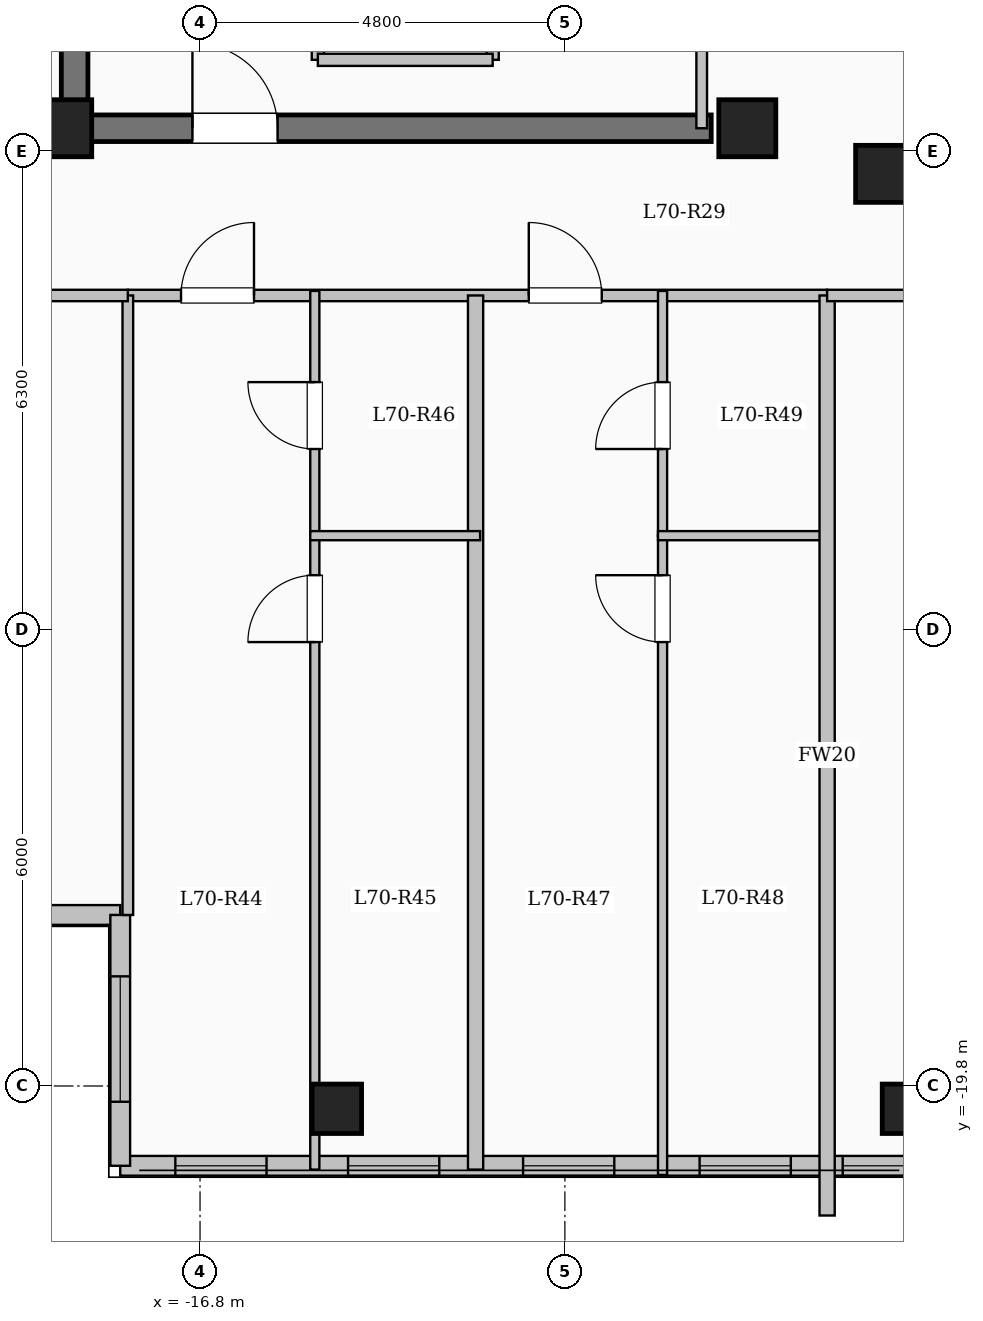
"""IFC4 building model, lengths in metres.
Left out: names, types, materials, properties, quantities, classifications, styles, units other than length and angle.
Written with IfcOpenShell. Run it as: python <this file> out.ifc"""

import sys

from ifc_helpers import new_model, si_unit, direction, frame, frame_2d, origin, origin_2d, place, context, subcontext, project, spatial, rectangle, extrude, element, fill, save


model = new_model("IFC4")
c1 = context("Model", 3, precision=1e-05, world=origin(), true_north=direction((0.0, 1.0)))
c2 = subcontext(c1, "Body", "Model", "MODEL_VIEW")
j1 = project(units=[si_unit("LENGTHUNIT", "METRE"), si_unit("PLANEANGLEUNIT", "RADIAN")], contexts=[c1])
p1 = place(None, origin())
s1 = spatial("IfcSite", under=j1, at=p1, CompositionType="ELEMENT")
p2 = place(p1, origin())
s2 = spatial("IfcBuilding", under=s1, at=p2, CompositionType="ELEMENT")
p3 = place(p2, frame((0.0, 0.0, 258.25)))
s3 = spatial("IfcBuildingStorey", under=s2, at=p3, CompositionType="ELEMENT", Elevation=258.25)
for number, where, z_axis, x_axis in (
    (1, (-7.8, -7.8, 0.0), (0.0, 0.0, 1.0), (1.0, 0.0, 0.0)),
    (2, (-9.6, -7.2, 0.0), (0.0, 0.0, 1.0), (1.0, 0.0, 0.0)),
    (3, (-18.6, -7.2, 0.0), (0.0, 0.0, 1.0), (1.0, 0.0, 0.0)),
):
    element("IfcColumn", number, at=place(p3, frame(where, z_axis=z_axis, x_axis=x_axis)), inside=s3, PredefinedType="COLUMN", context=c2, shape_type="SweptSolid", body=[
        extrude(rectangle(XDim=0.75, YDim=0.75, at=origin_2d()), origin(), (0.0, 0.0, 1.0), 3.35),
    ])
for number, where, z_axis, x_axis in (
    (4, (-15.0, -20.1, 0.0), (0.0, 0.0, 1.0), (1.0, 0.0, 0.0)),
    (5, (-7.5, -20.1, 0.0), (0.0, 0.0, 1.0), (1.0, 0.0, 0.0)),
):
    element("IfcColumn", number, at=place(p3, frame(where, z_axis=z_axis, x_axis=x_axis)), inside=s3, PredefinedType="COLUMN", context=c2, shape_type="SweptSolid", body=[
        extrude(rectangle(XDim=0.65, YDim=0.65, at=origin_2d()), origin(), (0.0, 0.0, 1.0), 3.35),
    ])
p4 = place(p3, frame((-17.85, -17.55, 0.0), z_axis=(0.0, 0.0, 1.0), x_axis=(-1.0, 0.0, 0.0)))
e6 = element("IfcWall", 6, at=p4, inside=s3, PredefinedType="SOLIDWALL", context=c2, shape_type="SweptSolid", body=[
    extrude(rectangle(XDim=4.8, YDim=0.26, at=frame_2d((2.4, 0.0))), origin(), (0.0, 0.0, 1.0), 3.1),
])
p5 = place(p4, frame((1.275, 0.0, 0.9)))
e7 = element("IfcOpeningElement", 7, at=p5, cuts=e6, PredefinedType="OPENING", context=c2, shape_type="SweptSolid", body=[
    extrude(rectangle(XDim=2.2, YDim=1.75, at=frame_2d((1.1, 0.875))), frame((0.0, 0.14, 0.0), z_axis=(0.0, -1.0, 0.0), x_axis=(1.0, 0.0, 0.0)), (0.0, 0.0, 1.0), 0.28),
])
p6 = place(p3, frame((-7.35, -20.85, 0.0), z_axis=(0.0, 0.0, 1.0), x_axis=(-1.0, 0.0, 0.0)))
e8 = element("IfcWall", 8, at=p6, inside=s3, PredefinedType="SOLIDWALL", context=c2, shape_type="SweptSolid", body=[
    extrude(rectangle(XDim=10.5, YDim=0.26, at=frame_2d((5.25, 0.0))), origin(), (0.0, 0.0, 1.0), 3.1),
])
p7 = place(p6, frame((0.145, 0.0, 0.95)))
e9 = element("IfcOpeningElement", 9, at=p7, cuts=e8, PredefinedType="OPENING", context=c2, shape_type="SweptSolid", body=[
    extrude(rectangle(XDim=0.85, YDim=1.5, at=frame_2d((0.425, 0.75))), frame((0.0, 0.14, 0.0), z_axis=(0.0, -1.0, 0.0), x_axis=(1.0, 0.0, 0.0)), (0.0, 0.0, 1.0), 0.28),
])
p8 = place(p6, frame((1.677, 0.0, 0.95)))
e10 = element("IfcOpeningElement", 10, at=p8, cuts=e8, PredefinedType="OPENING", context=c2, shape_type="SweptSolid", body=[
    extrude(rectangle(XDim=1.2, YDim=1.5, at=frame_2d((0.6, 0.75))), frame((0.0, 0.14, 0.0), z_axis=(0.0, -1.0, 0.0), x_axis=(1.0, 0.0, 0.0)), (0.0, 0.0, 1.0), 0.28),
])
p9 = place(p6, frame((4.0, 0.0, 0.95)))
e11 = element("IfcOpeningElement", 11, at=p9, cuts=e8, PredefinedType="OPENING", context=c2, shape_type="SweptSolid", body=[
    extrude(rectangle(XDim=1.2, YDim=1.5, at=frame_2d((0.6, 0.75))), frame((0.0, 0.14, 0.0), z_axis=(0.0, -1.0, 0.0), x_axis=(1.0, 0.0, 0.0)), (0.0, 0.0, 1.0), 0.28),
])
p10 = place(p6, frame((6.302, 0.0, 0.95)))
e12 = element("IfcOpeningElement", 12, at=p10, cuts=e8, PredefinedType="OPENING", context=c2, shape_type="SweptSolid", body=[
    extrude(rectangle(XDim=1.2, YDim=1.5, at=frame_2d((0.6, 0.75))), frame((0.0, 0.14, 0.0), z_axis=(0.0, -1.0, 0.0), x_axis=(1.0, 0.0, 0.0)), (0.0, 0.0, 1.0), 0.28),
])
p11 = place(p6, frame((8.575, 0.0, 0.95)))
e13 = element("IfcOpeningElement", 13, at=p11, cuts=e8, PredefinedType="OPENING", context=c2, shape_type="SweptSolid", body=[
    extrude(rectangle(XDim=1.2, YDim=1.5, at=frame_2d((0.6, 0.75))), frame((0.0, 0.14, 0.0), z_axis=(0.0, -1.0, 0.0), x_axis=(1.0, 0.0, 0.0)), (0.0, 0.0, 1.0), 0.28),
])
p12 = place(p3, frame((-17.85, -20.85, 0.0), z_axis=(0.0, 0.0, 1.0), x_axis=(0.0, 1.0, 0.0)))
e14 = element("IfcWall", 14, at=p12, inside=s3, PredefinedType="SOLIDWALL", context=c2, shape_type="SweptSolid", body=[
    extrude(rectangle(XDim=3.3, YDim=0.26, at=frame_2d((1.65, 0.0))), origin(), (0.0, 0.0, 1.0), 3.1),
])
p13 = place(p12, frame((0.843, 0.0, 0.9)))
e15 = element("IfcOpeningElement", 15, at=p13, cuts=e14, PredefinedType="OPENING", context=c2, shape_type="SweptSolid", body=[
    extrude(rectangle(XDim=1.65, YDim=1.6, at=frame_2d((0.825, 0.8))), frame((0.0, 0.14, 0.0), z_axis=(0.0, -1.0, 0.0), x_axis=(1.0, 0.0, 0.0)), (0.0, 0.0, 1.0), 0.28),
])
p14 = place(p3, frame((-15.25, -6.3, 0.0), z_axis=(0.0, 0.0, 1.0), x_axis=(0.0, 1.0, 0.0)))
e16 = element("IfcWall", 16, at=p14, inside=s3, PredefinedType="SOLIDWALL", context=c2, shape_type="SweptSolid", body=[
    extrude(rectangle(XDim=2.6, YDim=0.16, at=frame_2d((1.3, 0.0))), origin(), (0.0, 0.0, 1.0), 3.1),
])
p15 = place(p14, frame((0.75, 0.0, 0.0)))
e17 = element("IfcOpeningElement", 17, at=p15, cuts=e16, PredefinedType="OPENING", context=c2, shape_type="SweptSolid", body=[
    extrude(rectangle(XDim=1.1, YDim=2.15, at=frame_2d((0.55, 1.075))), frame((0.0, 0.09, 0.0), z_axis=(0.0, -1.0, 0.0), x_axis=(1.0, 0.0, 0.0)), (0.0, 0.0, 1.0), 0.18),
])
p16 = place(p3, frame((-12.95, -6.3, 0.0), z_axis=(0.0, 0.0, 1.0), x_axis=(0.0, 1.0, 0.0)))
e18 = element("IfcWall", 18, at=p16, inside=s3, PredefinedType="SOLIDWALL", context=c2, shape_type="SweptSolid", body=[
    extrude(rectangle(XDim=2.6, YDim=0.16, at=frame_2d((1.3, 0.0))), origin(), (0.0, 0.0, 1.0), 3.1),
])
p17 = place(p3, frame((-15.25, -6.3, 0.0), z_axis=(0.0, 0.0, 1.0), x_axis=(1.0, 0.0, 0.0)))
e19 = element("IfcWall", 19, at=p17, inside=s3, PredefinedType="SOLIDWALL", context=c2, shape_type="SweptSolid", body=[
    extrude(rectangle(XDim=2.3, YDim=0.16, at=frame_2d((1.15, 0.0))), origin(), (0.0, 0.0, 1.0), 3.1),
])
p18 = place(p3, frame((-18.45, -7.375, 0.0), z_axis=(0.0, 0.0, 1.0), x_axis=(0.0, 1.0, 0.0)))
e20 = element("IfcWall", 20, at=p18, inside=s3, PredefinedType="SHEAR", context=c2, shape_type="SweptSolid", body=[
    extrude(rectangle(XDim=14.05, YDim=0.35, at=frame_2d((7.025, 0.0))), origin(), (0.0, 0.0, 1.0), 3.35),
])
p19 = place(p3, frame((-18.625, -7.2, 0.0), z_axis=(0.0, 0.0, 1.0), x_axis=(1.0, 0.0, 0.0)))
e21 = element("IfcWall", 21, at=p19, inside=s3, PredefinedType="SHEAR", context=c2, shape_type="SweptSolid", body=[
    extrude(rectangle(XDim=8.55, YDim=0.35, at=frame_2d((4.275, 0.0))), origin(), (0.0, 0.0, 1.0), 3.35),
])
p20 = place(p19, frame((1.725, 0.0, 0.0)))
e22 = element("IfcOpeningElement", 22, at=p20, cuts=e21, PredefinedType="OPENING", context=c2, shape_type="SweptSolid", body=[
    extrude(rectangle(XDim=1.12, YDim=2.15, at=frame_2d((0.56, 1.075))), frame((0.0, 0.185, 0.0), z_axis=(0.0, -1.0, 0.0), x_axis=(1.0, 0.0, 0.0)), (0.0, 0.0, 1.0), 0.37),
])
p21 = place(p3, frame((-10.2, -7.2, 0.0), z_axis=(0.0, 0.0, 1.0), x_axis=(0.0, 1.0, 0.0)))
e23 = element("IfcWall", 23, at=p21, inside=s3, PredefinedType="PARTITIONING", context=c2, shape_type="SweptSolid", body=[
    extrude(rectangle(XDim=9.12, YDim=0.14, at=frame_2d((4.56, 0.0))), origin(), (0.0, 0.0, 1.0), 3.1),
])
p22 = place(p21, frame((1.6, 0.0, 0.0)))
e24 = element("IfcOpeningElement", 24, at=p22, cuts=e23, PredefinedType="OPENING", context=c2, shape_type="SweptSolid", body=[
    extrude(rectangle(XDim=0.95, YDim=2.12, at=frame_2d((0.475, 1.06))), frame((0.0, 0.08, 0.0), z_axis=(0.0, -1.0, 0.0), x_axis=(1.0, 0.0, 0.0)), (0.0, 0.0, 1.0), 0.16),
])
p23 = place(p21, frame((7.9, 0.0, 0.0)))
e25 = element("IfcOpeningElement", 25, at=p23, cuts=e23, PredefinedType="OPENING", context=c2, shape_type="SweptSolid", body=[
    extrude(rectangle(XDim=0.95, YDim=2.12, at=frame_2d((0.475, 1.06))), frame((0.0, 0.08, 0.0), z_axis=(0.0, -1.0, 0.0), x_axis=(1.0, 0.0, 0.0)), (0.0, 0.0, 1.0), 0.16),
])
p24 = place(p3, frame((-17.75, -9.4, 0.0), z_axis=(0.0, 0.0, 1.0), x_axis=(1.0, 0.0, 0.0)))
e26 = element("IfcWall", 26, at=p24, inside=s3, PredefinedType="PARTITIONING", context=c2, shape_type="SweptSolid", body=[
    extrude(rectangle(XDim=9.2, YDim=0.15, at=frame_2d((4.6, 0.0))), origin(), (0.0, 0.0, 1.0), 3.1),
])
p25 = place(p24, frame((0.7, 0.0, 0.0)))
e27 = element("IfcOpeningElement", 27, at=p25, cuts=e26, PredefinedType="OPENING", context=c2, shape_type="SweptSolid", body=[
    extrude(rectangle(XDim=0.96, YDim=2.15, at=frame_2d((0.48, 1.075))), frame((0.0, 0.085, 0.0), z_axis=(0.0, -1.0, 0.0), x_axis=(1.0, 0.0, 0.0)), (0.0, 0.0, 1.0), 0.17),
])
p26 = place(p24, frame((5.275, 0.0, 0.0)))
e28 = element("IfcOpeningElement", 28, at=p26, cuts=e26, PredefinedType="OPENING", context=c2, shape_type="SweptSolid", body=[
    extrude(rectangle(XDim=0.96, YDim=2.15, at=frame_2d((0.48, 1.075))), frame((0.0, 0.085, 0.0), z_axis=(0.0, -1.0, 0.0), x_axis=(1.0, 0.0, 0.0)), (0.0, 0.0, 1.0), 0.17),
])
p27 = place(p3, frame((-13.175, -20.9, 0.0), z_axis=(0.0, 0.0, 1.0), x_axis=(0.0, 1.0, 0.0)))
e29 = element("IfcWall", 29, at=p27, inside=s3, PredefinedType="SOLIDWALL", context=c2, shape_type="SweptSolid", body=[
    extrude(rectangle(XDim=11.5, YDim=0.2, at=frame_2d((5.75, 0.0))), origin(), (0.0, 0.0, 1.0), 3.1),
])
p28 = place(p3, frame((-15.29, -20.9, 0.0), z_axis=(0.0, 0.0, 1.0), x_axis=(0.0, 1.0, 0.0)))
e30 = element("IfcWall", 30, at=p28, inside=s3, PredefinedType="PARTITIONING", context=c2, shape_type="SweptSolid", body=[
    extrude(rectangle(XDim=8.34, YDim=0.12, at=frame_2d((4.17, 0.0))), origin(), (0.0, 0.0, 1.0), 2.685),
])
p29 = place(p28, frame((6.94, 0.0, 0.0)))
e31 = element("IfcOpeningElement", 31, at=p29, cuts=e30, PredefinedType="OPENING", context=c2, shape_type="SweptSolid", body=[
    extrude(rectangle(XDim=0.88, YDim=2.1, at=frame_2d((0.44, 1.05))), frame((0.0, 0.07, 0.0), z_axis=(0.0, -1.0, 0.0), x_axis=(1.0, 0.0, 0.0)), (0.0, 0.0, 1.0), 0.14),
])
p30 = place(p3, frame((-15.29, -12.56, 0.0), z_axis=(0.0, 0.0, 1.0), x_axis=(0.0, 1.0, 0.0)))
e32 = element("IfcWall", 32, at=p30, inside=s3, PredefinedType="PARTITIONING", context=c2, shape_type="SweptSolid", body=[
    extrude(rectangle(XDim=3.22, YDim=0.12, at=frame_2d((1.61, 0.0))), origin(), (0.0, 0.0, 1.0), 2.685),
])
p31 = place(p30, frame((1.14, 0.0, 0.0)))
e33 = element("IfcOpeningElement", 33, at=p31, cuts=e32, PredefinedType="OPENING", context=c2, shape_type="SweptSolid", body=[
    extrude(rectangle(XDim=0.88, YDim=2.1, at=frame_2d((0.44, 1.05))), frame((0.0, 0.07, 0.0), z_axis=(0.0, -1.0, 0.0), x_axis=(1.0, 0.0, 0.0)), (0.0, 0.0, 1.0), 0.14),
])
p32 = place(p3, frame((-15.35, -12.56, 0.0), z_axis=(0.0, 0.0, 1.0), x_axis=(1.0, 0.0, 0.0)))
e34 = element("IfcWall", 34, at=p32, inside=s3, PredefinedType="PARTITIONING", context=c2, shape_type="SweptSolid", body=[
    extrude(rectangle(XDim=2.235, YDim=0.12, at=frame_2d((1.118, 0.0))), origin(), (0.0, 0.0, 1.0), 2.785),
])
p33 = place(p3, frame((-10.715, -20.97, 0.0), z_axis=(0.0, 0.0, 1.0), x_axis=(0.0, 1.0, 0.0)))
e35 = element("IfcWall", 35, at=p33, inside=s3, PredefinedType="PARTITIONING", context=c2, shape_type="SweptSolid", body=[
    extrude(rectangle(XDim=8.41, YDim=0.12, at=frame_2d((4.205, 0.0))), origin(), (0.0, 0.0, 1.0), 3.1),
])
p34 = place(p33, frame((7.01, 0.0, 0.0)))
e36 = element("IfcOpeningElement", 36, at=p34, cuts=e35, PredefinedType="OPENING", context=c2, shape_type="SweptSolid", body=[
    extrude(rectangle(XDim=0.88, YDim=2.1, at=frame_2d((0.44, 1.05))), frame((0.0, 0.07, 0.0), z_axis=(0.0, -1.0, 0.0), x_axis=(1.0, 0.0, 0.0)), (0.0, 0.0, 1.0), 0.14),
])
p35 = place(p3, frame((-10.715, -12.56, 0.0), z_axis=(0.0, 0.0, 1.0), x_axis=(0.0, 1.0, 0.0)))
e37 = element("IfcWall", 37, at=p35, inside=s3, PredefinedType="PARTITIONING", context=c2, shape_type="SweptSolid", body=[
    extrude(rectangle(XDim=3.22, YDim=0.12, at=frame_2d((1.61, 0.0))), origin(), (0.0, 0.0, 1.0), 3.1),
])
p36 = place(p35, frame((1.14, 0.0, 0.0)))
e38 = element("IfcOpeningElement", 38, at=p36, cuts=e37, PredefinedType="OPENING", context=c2, shape_type="SweptSolid", body=[
    extrude(rectangle(XDim=0.88, YDim=2.1, at=frame_2d((0.44, 1.05))), frame((0.0, 0.07, 0.0), z_axis=(0.0, -1.0, 0.0), x_axis=(1.0, 0.0, 0.0)), (0.0, 0.0, 1.0), 0.14),
])
p37 = place(p3, frame((-10.775, -12.56, 0.0), z_axis=(0.0, 0.0, 1.0), x_axis=(1.0, 0.0, 0.0)))
e39 = element("IfcWall", 39, at=p37, inside=s3, PredefinedType="PARTITIONING", context=c2, shape_type="SweptSolid", body=[
    extrude(rectangle(XDim=2.235, YDim=0.12, at=frame_2d((1.117, 0.0))), origin(), (0.0, 0.0, 1.0), 2.785),
])
p38 = place(p3, frame((-8.55, -21.504, 0.0), z_axis=(0.0, 0.0, 1.0), x_axis=(0.0, 1.0, 0.0)))
e40 = element("IfcWall", 40, at=p38, inside=s3, PredefinedType="SOLIDWALL", context=c2, shape_type="SweptSolid", body=[
    extrude(rectangle(XDim=12.104, YDim=0.2, at=frame_2d((6.052, 0.0))), origin(), (0.0, 0.0, 1.0), 3.1),
])
p39 = place(p3, frame((-8.55, -9.4, 0.0), z_axis=(0.0, 0.0, 1.0), x_axis=(1.0, 0.0, 0.0)))
e41 = element("IfcWall", 41, at=p39, inside=s3, PredefinedType="PARTITIONING", context=c2, shape_type="SweptSolid", body=[
    extrude(rectangle(XDim=17.1, YDim=0.15, at=frame_2d((8.55, 0.0))), origin(), (0.0, 0.0, 1.0), 3.1),
])
p40 = place(p39, frame((1.75, 0.0, 0.0)))
e42 = element("IfcOpeningElement", 42, at=p40, cuts=e41, PredefinedType="OPENING", context=c2, shape_type="SweptSolid", body=[
    extrude(rectangle(XDim=0.95, YDim=2.15, at=frame_2d((0.475, 1.075))), frame((0.0, 0.085, 0.0), z_axis=(0.0, -1.0, 0.0), x_axis=(1.0, 0.0, 0.0)), (0.0, 0.0, 1.0), 0.17),
])
p41 = place(p39, frame((10.5, 0.0, 0.0)))
e43 = element("IfcOpeningElement", 43, at=p41, cuts=e41, PredefinedType="OPENING", context=c2, shape_type="SweptSolid", body=[
    extrude(rectangle(XDim=0.95, YDim=2.15, at=frame_2d((0.475, 1.075))), frame((0.0, 0.085, 0.0), z_axis=(0.0, -1.0, 0.0), x_axis=(1.0, 0.0, 0.0)), (0.0, 0.0, 1.0), 0.17),
])
p42 = place(p3, frame((-22.68, -7.25, 0.0), z_axis=(0.0, 0.0, 1.0), x_axis=(1.0, 0.0, 0.0)))
e44 = element("IfcWall", 44, at=p42, inside=s3, PredefinedType="PARTITIONING", context=c2, shape_type="SweptSolid", body=[
    extrude(rectangle(XDim=4.23, YDim=0.15, at=frame_2d((2.115, 0.0))), origin(), (0.0, 0.0, 1.0), 3.1),
])
p43 = place(p42, frame((1.63, 0.0, 0.0)))
e45 = element("IfcOpeningElement", 45, at=p43, cuts=e44, PredefinedType="OPENING", context=c2, shape_type="SweptSolid", body=[
    extrude(rectangle(XDim=1.08, YDim=2.15, at=frame_2d((0.54, 1.075))), frame((0.0, 0.085, 0.0), z_axis=(0.0, -1.0, 0.0), x_axis=(1.0, 0.0, 0.0)), (0.0, 0.0, 1.0), 0.17),
])
p44 = place(p3, frame((-17.75, -17.55, 0.0), z_axis=(0.0, 0.0, 1.0), x_axis=(0.0, 1.0, 0.0)))
e46 = element("IfcWall", 46, at=p44, inside=s3, PredefinedType="PARTITIONING", context=c2, shape_type="SweptSolid", body=[
    extrude(rectangle(XDim=8.15, YDim=0.14, at=frame_2d((4.075, 0.0))), origin(), (0.0, 0.0, 1.0), 3.1),
])
p45 = place(p3, frame((-22.68, -9.4, 0.0), z_axis=(0.0, 0.0, 1.0), x_axis=(1.0, 0.0, 0.0)))
e47 = element("IfcWall", 47, at=p45, inside=s3, PredefinedType="PARTITIONING", context=c2, shape_type="SweptSolid", body=[
    extrude(rectangle(XDim=4.93, YDim=0.15, at=frame_2d((2.465, 0.0))), origin(), (0.0, 0.0, 1.0), 3.1),
])
p46 = place(p45, frame((1.99, 0.0, 0.0)))
e48 = element("IfcOpeningElement", 48, at=p46, cuts=e47, PredefinedType="OPENING", context=c2, shape_type="SweptSolid", body=[
    extrude(rectangle(XDim=0.95, YDim=2.15, at=frame_2d((0.475, 1.075))), frame((0.0, 0.085, 0.0), z_axis=(0.0, -1.0, 0.0), x_axis=(1.0, 0.0, 0.0)), (0.0, 0.0, 1.0), 0.17),
])
p47 = place(p7, origin())
e49 = element("IfcWindow", 49, at=p47, inside=s3, PartitioningType="SINGLE_PANEL", PredefinedType="WINDOW", context=c2, shape_type="SweptSolid", body=[
    extrude(rectangle(XDim=0.85, YDim=1.5, at=frame_2d((0.425, 0.75))), frame((0.0, 0.03, 0.0), z_axis=(0.0, -1.0, 0.0), x_axis=(1.0, 0.0, 0.0)), (0.0, 0.0, 1.0), 0.06),
])
fill(e9, e49)
p48 = place(p8, origin())
e50 = element("IfcWindow", 50, at=p48, inside=s3, PartitioningType="SINGLE_PANEL", PredefinedType="WINDOW", context=c2, shape_type="SweptSolid", body=[
    extrude(rectangle(XDim=1.2, YDim=1.5, at=frame_2d((0.6, 0.75))), frame((0.0, 0.03, 0.0), z_axis=(0.0, -1.0, 0.0), x_axis=(1.0, 0.0, 0.0)), (0.0, 0.0, 1.0), 0.06),
])
fill(e10, e50)
p49 = place(p9, origin())
e51 = element("IfcWindow", 51, at=p49, inside=s3, PartitioningType="SINGLE_PANEL", PredefinedType="WINDOW", context=c2, shape_type="SweptSolid", body=[
    extrude(rectangle(XDim=1.2, YDim=1.5, at=frame_2d((0.6, 0.75))), frame((0.0, 0.03, 0.0), z_axis=(0.0, -1.0, 0.0), x_axis=(1.0, 0.0, 0.0)), (0.0, 0.0, 1.0), 0.06),
])
fill(e11, e51)
p50 = place(p10, origin())
e52 = element("IfcWindow", 52, at=p50, inside=s3, PartitioningType="SINGLE_PANEL", PredefinedType="WINDOW", context=c2, shape_type="SweptSolid", body=[
    extrude(rectangle(XDim=1.2, YDim=1.5, at=frame_2d((0.6, 0.75))), frame((0.0, 0.03, 0.0), z_axis=(0.0, -1.0, 0.0), x_axis=(1.0, 0.0, 0.0)), (0.0, 0.0, 1.0), 0.06),
])
fill(e12, e52)
p51 = place(p11, origin())
e53 = element("IfcWindow", 53, at=p51, inside=s3, PartitioningType="SINGLE_PANEL", PredefinedType="WINDOW", context=c2, shape_type="SweptSolid", body=[
    extrude(rectangle(XDim=1.2, YDim=1.5, at=frame_2d((0.6, 0.75))), frame((0.0, 0.03, 0.0), z_axis=(0.0, -1.0, 0.0), x_axis=(1.0, 0.0, 0.0)), (0.0, 0.0, 1.0), 0.06),
])
fill(e13, e53)
p52 = place(p13, origin())
e54 = element("IfcWindow", 54, at=p52, inside=s3, PartitioningType="SINGLE_PANEL", PredefinedType="WINDOW", context=c2, shape_type="SweptSolid", body=[
    extrude(rectangle(XDim=1.65, YDim=1.6, at=frame_2d((0.825, 0.8))), frame((0.0, 0.03, 0.0), z_axis=(0.0, -1.0, 0.0), x_axis=(1.0, 0.0, 0.0)), (0.0, 0.0, 1.0), 0.06),
])
fill(e15, e54)
p53 = place(p20, origin())
e55 = element("IfcDoor", 55, at=p53, inside=s3, OperationType="SINGLE_SWING_LEFT", PredefinedType="DOOR", context=c2, shape_type="SweptSolid", body=[
    extrude(rectangle(XDim=1.12, YDim=2.15, at=frame_2d((0.56, 1.075))), frame((0.0, 0.025, 0.0), z_axis=(0.0, -1.0, 0.0), x_axis=(1.0, 0.0, 0.0)), (0.0, 0.0, 1.0), 0.05),
])
fill(e22, e55)
p54 = place(p25, origin())
e56 = element("IfcDoor", 56, at=p54, inside=s3, OperationType="SINGLE_SWING_RIGHT", PredefinedType="DOOR", context=c2, shape_type="SweptSolid", body=[
    extrude(rectangle(XDim=0.96, YDim=2.15, at=frame_2d((0.48, 1.075))), frame((0.0, 0.025, 0.0), z_axis=(0.0, -1.0, 0.0), x_axis=(1.0, 0.0, 0.0)), (0.0, 0.0, 1.0), 0.05),
])
fill(e27, e56)
p55 = place(p29, origin())
e57 = element("IfcDoor", 57, at=p55, inside=s3, OperationType="SINGLE_SWING_LEFT", PredefinedType="DOOR", context=c2, shape_type="SweptSolid", body=[
    extrude(rectangle(XDim=0.88, YDim=2.1, at=frame_2d((0.44, 1.05))), frame((0.0, 0.025, 0.0), z_axis=(0.0, -1.0, 0.0), x_axis=(1.0, 0.0, 0.0)), (0.0, 0.0, 1.0), 0.05),
])
fill(e31, e57)
p56 = place(p31, origin())
e58 = element("IfcDoor", 58, at=p56, inside=s3, OperationType="SINGLE_SWING_RIGHT", PredefinedType="DOOR", context=c2, shape_type="SweptSolid", body=[
    extrude(rectangle(XDim=0.88, YDim=2.1, at=frame_2d((0.44, 1.05))), frame((0.0, 0.025, 0.0), z_axis=(0.0, -1.0, 0.0), x_axis=(1.0, 0.0, 0.0)), (0.0, 0.0, 1.0), 0.05),
])
fill(e33, e58)
p57 = place(p26, origin())
e59 = element("IfcDoor", 59, at=p57, inside=s3, OperationType="SINGLE_SWING_LEFT", PredefinedType="DOOR", context=c2, shape_type="SweptSolid", body=[
    extrude(rectangle(XDim=0.96, YDim=2.15, at=frame_2d((0.48, 1.075))), frame((0.0, 0.025, 0.0), z_axis=(0.0, -1.0, 0.0), x_axis=(1.0, 0.0, 0.0)), (0.0, 0.0, 1.0), 0.05),
])
fill(e28, e59)
p58 = place(p34, origin())
e60 = element("IfcDoor", 60, at=p58, inside=s3, OperationType="SINGLE_SWING_RIGHT", PredefinedType="DOOR", context=c2, shape_type="SweptSolid", body=[
    extrude(rectangle(XDim=0.88, YDim=2.1, at=frame_2d((0.44, 1.05))), frame((0.0, 0.025, 0.0), z_axis=(0.0, -1.0, 0.0), x_axis=(1.0, 0.0, 0.0)), (0.0, 0.0, 1.0), 0.05),
])
fill(e36, e60)
p59 = place(p36, origin())
e61 = element("IfcDoor", 61, at=p59, inside=s3, OperationType="SINGLE_SWING_LEFT", PredefinedType="DOOR", context=c2, shape_type="SweptSolid", body=[
    extrude(rectangle(XDim=0.88, YDim=2.1, at=frame_2d((0.44, 1.05))), frame((0.0, 0.025, 0.0), z_axis=(0.0, -1.0, 0.0), x_axis=(1.0, 0.0, 0.0)), (0.0, 0.0, 1.0), 0.05),
])
fill(e38, e61)
save(model, sys.argv[1])
